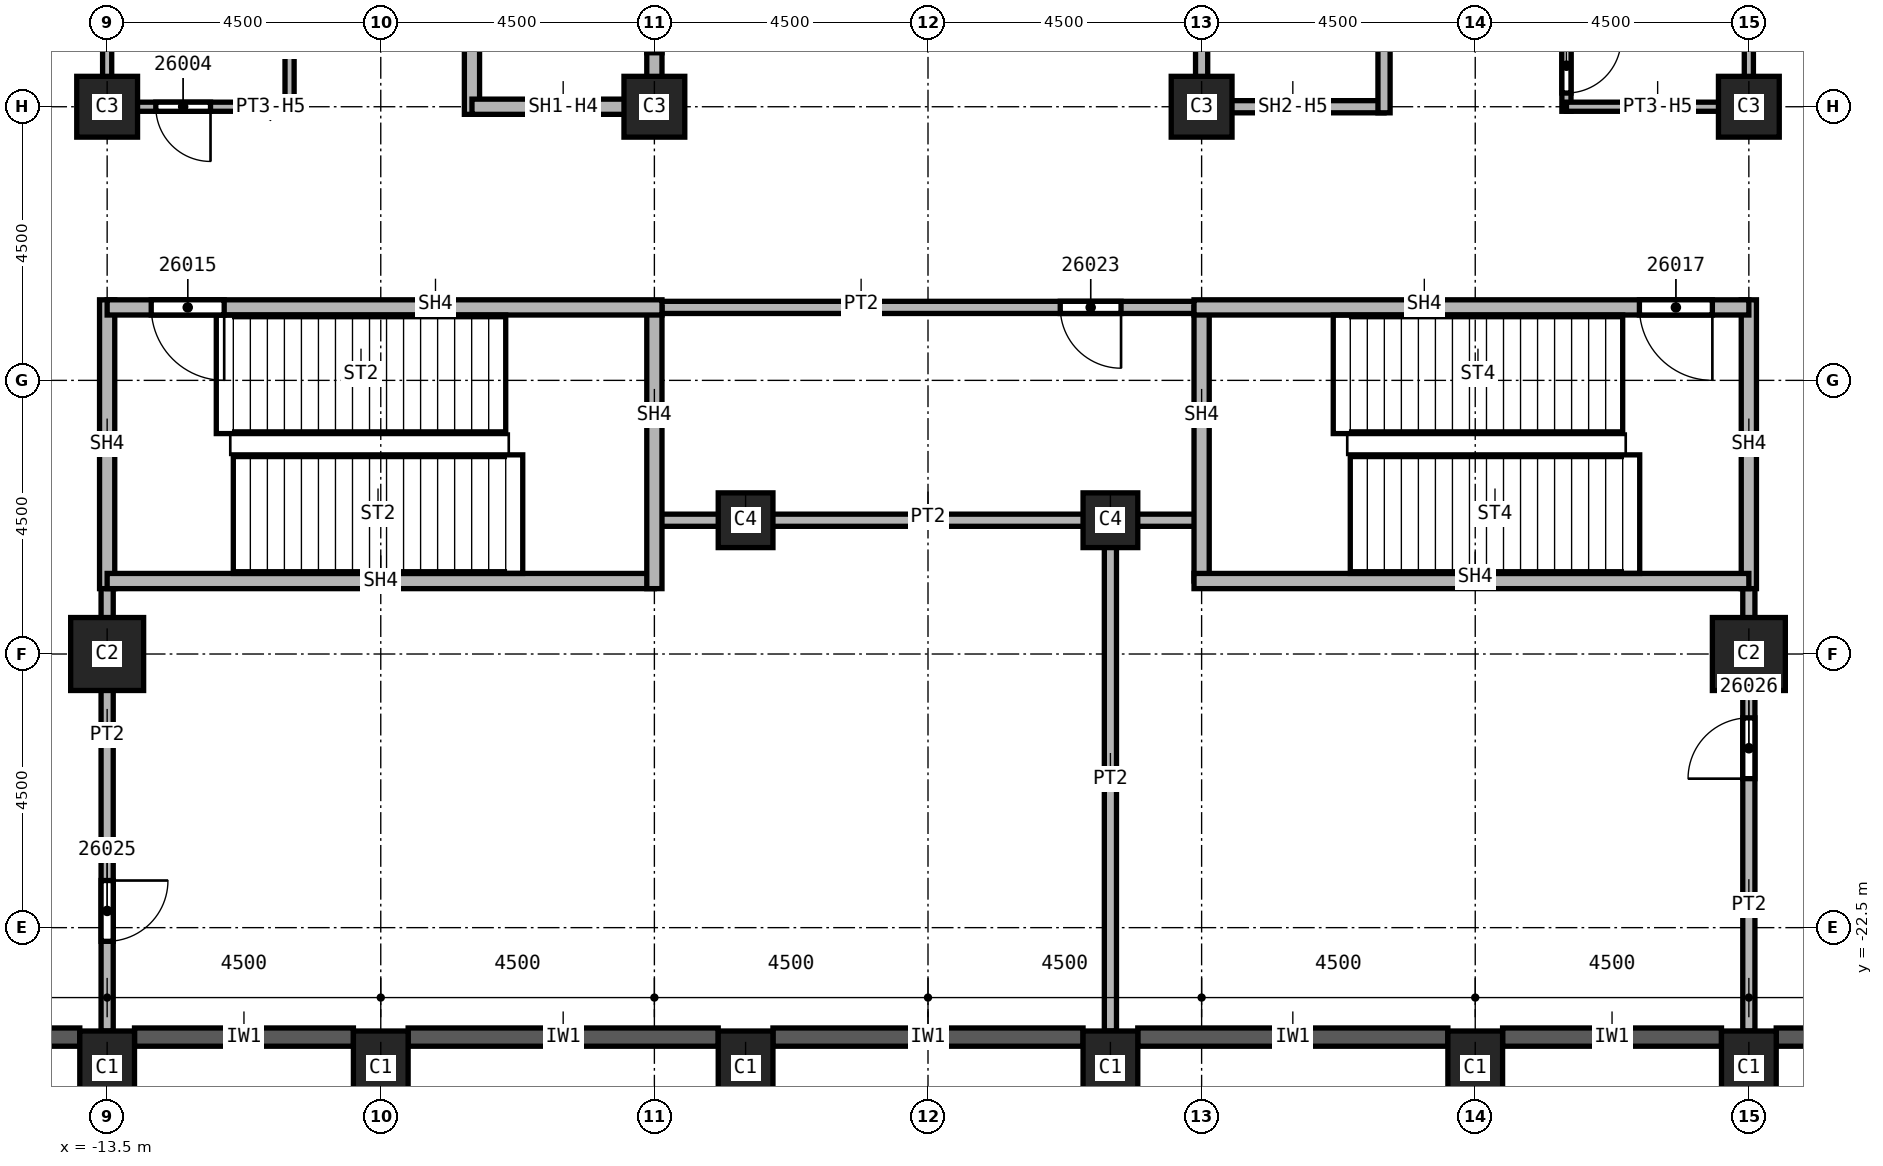
"""IFC4 building model, lengths in metres.
Left out: names, types, materials, properties, quantities, classifications, styles, units other than length and angle.
Written with IfcOpenShell. Run it as: python <this file> out.ifc"""

import sys

from ifc_helpers import new_model, si_unit, direction, frame, frame_2d, origin, origin_2d, place, context, subcontext, project, spatial, rectangle, extrude, element, fill, save


model = new_model("IFC4")
c1 = context("Model", 3, precision=1e-05, world=origin(), true_north=direction((0.0, 1.0)))
c2 = subcontext(c1, "Body", "Model", "MODEL_VIEW")
j1 = project(units=[si_unit("LENGTHUNIT", "METRE"), si_unit("PLANEANGLEUNIT", "RADIAN")], contexts=[c1])
p1 = place(None, origin())
s1 = spatial("IfcSite", under=j1, at=p1, CompositionType="ELEMENT")
p2 = place(p1, origin())
s2 = spatial("IfcBuilding", under=s1, at=p2, CompositionType="ELEMENT")
p3 = place(p2, frame((0.0, 0.0, 120.0)))
s3 = spatial("IfcBuildingStorey", under=s2, at=p3, CompositionType="ELEMENT", Elevation=120.0)
for number, where, z_axis, x_axis in (
    (1, (13.5, -18.0, 0.0), (0.0, 0.0, 1.0), (1.0, 0.0, 0.0)),
    (2, (-13.5, -18.0, 0.0), (0.0, 0.0, 1.0), (1.0, 0.0, 0.0)),
):
    element("IfcColumn", number, at=place(p3, frame(where, z_axis=z_axis, x_axis=x_axis)), inside=s3, PredefinedType="COLUMN", context=c2, shape_type="SweptSolid", body=[
        extrude(rectangle(XDim=1.2, YDim=1.2, at=origin_2d()), origin(), (0.0, 0.0, 1.0), 5.7),
    ])
for number, where, z_axis, x_axis in (
    (3, (4.5, -9.0, 0.0), (0.0, 0.0, 1.0), (1.0, 0.0, 0.0)),
    (4, (13.5, -9.0, 0.0), (0.0, 0.0, 1.0), (1.0, 0.0, 0.0)),
    (5, (-4.5, -9.0, 0.0), (0.0, 0.0, 1.0), (1.0, 0.0, 0.0)),
    (6, (-13.5, -9.0, 0.0), (0.0, 0.0, 1.0), (1.0, 0.0, 0.0)),
):
    element("IfcColumn", number, at=place(p3, frame(where, z_axis=z_axis, x_axis=x_axis)), inside=s3, PredefinedType="COLUMN", context=c2, shape_type="SweptSolid", body=[
        extrude(rectangle(XDim=1.0, YDim=1.0, at=origin_2d()), origin(), (0.0, 0.0, 1.0), 5.7),
    ])
for number, where, z_axis, x_axis in (
    (7, (3.0, -24.8, 0.0), (0.0, 0.206, 0.979), (-1.0, 0.0, 0.0)),
    (8, (9.0, -24.8, 0.0), (0.0, 0.206, 0.979), (-1.0, 0.0, 0.0)),
    (9, (13.5, -24.8, 0.0), (0.0, 0.206, 0.979), (-1.0, 0.0, 0.0)),
    (10, (-3.0, -24.8, 0.0), (0.0, 0.206, 0.979), (-1.0, 0.0, 0.0)),
    (11, (-9.0, -24.8, 0.0), (0.0, 0.206, 0.979), (-1.0, 0.0, 0.0)),
    (12, (-13.5, -24.8, 0.0), (0.0, 0.206, 0.979), (-1.0, 0.0, 0.0)),
):
    element("IfcColumn", number, at=place(p3, frame(where, z_axis=z_axis, x_axis=x_axis)), inside=s3, PredefinedType="COLUMN", context=c2, shape_type="SweptSolid", body=[
        extrude(rectangle(XDim=0.9, YDim=1.2, at=origin_2d()), origin(), (0.0, 0.0, 1.0), 5.825),
    ])
for number, where, z_axis, x_axis in (
    (13, (3.0, -15.8, 0.0), (0.0, 0.206, 0.979), (-1.0, 0.0, 0.0)),
    (14, (-3.0, -15.8, 0.0), (0.0, 0.206, 0.979), (-1.0, 0.0, 0.0)),
):
    element("IfcColumn", number, at=place(p3, frame(where, z_axis=z_axis, x_axis=x_axis)), inside=s3, PredefinedType="COLUMN", context=c2, shape_type="SweptSolid", body=[
        extrude(rectangle(XDim=0.9, YDim=0.9, at=origin_2d()), origin(), (0.0, 0.0, 1.0), 5.825),
    ])
for number, where, z_axis, x_axis in (
    (15, (-17.55, -24.3, 0.0), (0.0, 0.0, 1.0), (1.0, 0.0, 0.0)),
    (16, (-13.05, -24.3, 0.0), (0.0, 0.0, 1.0), (1.0, 0.0, 0.0)),
):
    element("IfcWall", number, at=place(p3, frame(where, z_axis=z_axis, x_axis=x_axis)), inside=s3, PredefinedType="SOLIDWALL", context=c2, shape_type="SweptSolid", body=[
        extrude(rectangle(XDim=3.6, YDim=0.3, at=frame_2d((1.8, 0.0))), origin(), (0.0, 0.0, 1.0), 5.1),
    ])
for number, where, z_axis, x_axis in (
    (17, (-8.55, -24.3, 0.0), (0.0, 0.0, 1.0), (1.0, 0.0, 0.0)),
    (18, (-2.55, -24.3, 0.0), (0.0, 0.0, 1.0), (1.0, 0.0, 0.0)),
    (19, (3.45, -24.3, 0.0), (0.0, 0.0, 1.0), (1.0, 0.0, 0.0)),
):
    element("IfcWall", number, at=place(p3, frame(where, z_axis=z_axis, x_axis=x_axis)), inside=s3, PredefinedType="SOLIDWALL", context=c2, shape_type="SweptSolid", body=[
        extrude(rectangle(XDim=5.1, YDim=0.3, at=frame_2d((2.55, 0.0))), origin(), (0.0, 0.0, 1.0), 5.1),
    ])
for number, where, z_axis, x_axis in (
    (20, (9.45, -24.3, 0.0), (0.0, 0.0, 1.0), (1.0, 0.0, 0.0)),
    (21, (13.95, -24.3, 0.0), (0.0, 0.0, 1.0), (1.0, 0.0, 0.0)),
):
    element("IfcWall", number, at=place(p3, frame(where, z_axis=z_axis, x_axis=x_axis)), inside=s3, PredefinedType="SOLIDWALL", context=c2, shape_type="SweptSolid", body=[
        extrude(rectangle(XDim=3.6, YDim=0.3, at=frame_2d((1.8, 0.0))), origin(), (0.0, 0.0, 1.0), 5.1),
    ])
p4 = place(p3, frame((-13.5, -16.675, 0.0), z_axis=(0.0, 0.0, 1.0), x_axis=(0.0, -1.0, 0.0)))
e22 = element("IfcWall", 22, at=p4, inside=s3, PredefinedType="PARTITIONING", context=c2, shape_type="SweptSolid", body=[
    extrude(rectangle(XDim=7.525, YDim=0.2, at=frame_2d((3.762, 0.0))), origin(), (0.0, 0.0, 1.0), 5.7),
])
p5 = place(p4, frame((5.05, 0.0, 0.0)))
e23 = element("IfcOpeningElement", 23, at=p5, cuts=e22, PredefinedType="OPENING", context=c2, shape_type="SweptSolid", body=[
    extrude(rectangle(XDim=1.0, YDim=2.1, at=frame_2d((0.5, 1.05))), frame((0.0, 0.1, 0.0), z_axis=(0.0, -1.0, 0.0), x_axis=(1.0, 0.0, 0.0)), (0.0, 0.0, 1.0), 0.2),
])
p6 = place(p3, frame((4.5, -15.8, 0.0), z_axis=(0.0, 0.0, 1.0), x_axis=(-1.0, 0.0, 0.0)))
e24 = element("IfcWall", 24, at=p6, inside=s3, PredefinedType="PARTITIONING", context=c2, shape_type="SweptSolid", body=[
    extrude(rectangle(XDim=9.0, YDim=0.2, at=frame_2d((4.5, 0.0))), origin(), (0.0, 0.0, 1.0), 5.7),
])
p7 = place(p3, frame((3.0, -15.8, 0.0), z_axis=(0.0, 0.0, 1.0), x_axis=(0.0, -1.0, 0.0)))
e25 = element("IfcWall", 25, at=p7, inside=s3, PredefinedType="PARTITIONING", context=c2, shape_type="SweptSolid", body=[
    extrude(rectangle(XDim=8.4, YDim=0.2, at=frame_2d((4.2, 0.0))), origin(), (0.0, 0.0, 1.0), 5.7),
])
p8 = place(p3, frame((4.625, -12.3, 0.0), z_axis=(0.0, 0.0, 1.0), x_axis=(-1.0, 0.0, 0.0)))
e26 = element("IfcWall", 26, at=p8, inside=s3, PredefinedType="PARTITIONING", context=c2, shape_type="SweptSolid", body=[
    extrude(rectangle(XDim=9.25, YDim=0.2, at=frame_2d((4.625, 0.0))), origin(), (0.0, 0.0, 1.0), 5.7),
])
p9 = place(p8, frame((1.45, 0.0, 0.0)))
e27 = element("IfcOpeningElement", 27, at=p9, cuts=e26, PredefinedType="OPENING", context=c2, shape_type="SweptSolid", body=[
    extrude(rectangle(XDim=1.0, YDim=2.1, at=frame_2d((0.5, 1.05))), frame((0.0, 0.1, 0.0), z_axis=(0.0, -1.0, 0.0), x_axis=(1.0, 0.0, 0.0)), (0.0, 0.0, 1.0), 0.2),
])
p10 = place(p3, frame((13.5, -24.2, 0.0), z_axis=(0.0, 0.0, 1.0), x_axis=(0.0, 1.0, 0.0)))
e28 = element("IfcWall", 28, at=p10, inside=s3, PredefinedType="PARTITIONING", context=c2, shape_type="SweptSolid", body=[
    extrude(rectangle(XDim=7.525, YDim=0.2, at=frame_2d((3.762, 0.0))), origin(), (0.0, 0.0, 1.0), 5.7),
])
p11 = place(p10, frame((4.15, 0.0, 0.0)))
e29 = element("IfcOpeningElement", 29, at=p11, cuts=e28, PredefinedType="OPENING", context=c2, shape_type="SweptSolid", body=[
    extrude(rectangle(XDim=1.0, YDim=2.1, at=frame_2d((0.5, 1.05))), frame((0.0, 0.1, 0.0), z_axis=(0.0, -1.0, 0.0), x_axis=(1.0, 0.0, 0.0)), (0.0, 0.0, 1.0), 0.2),
])
p12 = place(p3, frame((4.5, -9.1, 0.0), z_axis=(0.0, 0.0, 1.0), x_axis=(0.0, 1.0, 0.0)))
e30 = element("IfcWall", 30, at=p12, inside=s3, PredefinedType="SOLIDWALL", context=c2, shape_type="SweptSolid", body=[
    extrude(rectangle(XDim=9.1, YDim=0.2, at=frame_2d((4.55, 0.0))), origin(), (0.0, 0.0, 1.0), 4.938),
])
p13 = place(p12, frame((2.2, 0.0, 0.0)))
e31 = element("IfcOpeningElement", 31, at=p13, cuts=e30, PredefinedType="OPENING", context=c2, shape_type="SweptSolid", body=[
    extrude(rectangle(XDim=1.1, YDim=2.1, at=frame_2d((0.55, 1.05))), frame((0.0, 0.1, 0.0), z_axis=(0.0, -1.0, 0.0), x_axis=(1.0, 0.0, 0.0)), (0.0, 0.0, 1.0), 0.2),
])
p14 = place(p3, frame((7.5, -9.0, 0.0), z_axis=(0.0, 0.0, 1.0), x_axis=(-1.0, 0.0, 0.0)))
e32 = element("IfcWall", 32, at=p14, inside=s3, PredefinedType="SOLIDWALL", context=c2, shape_type="SweptSolid", body=[
    extrude(rectangle(XDim=3.0, YDim=0.2, at=frame_2d((1.5, 0.0))), origin(), (0.0, 0.0, 1.0), 4.938),
])
p15 = place(p3, frame((7.5, -2.875, 0.0), z_axis=(0.0, 0.0, 1.0), x_axis=(0.0, -1.0, 0.0)))
e33 = element("IfcWall", 33, at=p15, inside=s3, PredefinedType="SOLIDWALL", context=c2, shape_type="SweptSolid", body=[
    extrude(rectangle(XDim=6.225, YDim=0.2, at=frame_2d((3.113, 0.0))), origin(), (0.0, 0.0, 1.0), 5.7),
])
p16 = place(p3, frame((-7.5, -9.125, 0.0), z_axis=(0.0, 0.0, 1.0), x_axis=(0.0, 1.0, 0.0)))
e34 = element("IfcWall", 34, at=p16, inside=s3, PredefinedType="SOLIDWALL", context=c2, shape_type="SweptSolid", body=[
    extrude(rectangle(XDim=12.25, YDim=0.25, at=frame_2d((6.125, 0.0))), origin(), (0.0, 0.0, 1.0), 5.7),
])
p17 = place(p3, frame((-4.5, -9.0, 0.0), z_axis=(0.0, 0.0, 1.0), x_axis=(-1.0, 0.0, 0.0)))
e35 = element("IfcWall", 35, at=p17, inside=s3, PredefinedType="SOLIDWALL", context=c2, shape_type="SweptSolid", body=[
    extrude(rectangle(XDim=3.0, YDim=0.25, at=frame_2d((1.5, 0.0))), origin(), (0.0, 0.0, 1.0), 4.938),
])
p18 = place(p3, frame((-4.5, 0.0, 0.0), z_axis=(0.0, 0.0, 1.0), x_axis=(0.0, -1.0, 0.0)))
e36 = element("IfcWall", 36, at=p18, inside=s3, PredefinedType="SOLIDWALL", context=c2, shape_type="SweptSolid", body=[
    extrude(rectangle(XDim=9.125, YDim=0.25, at=frame_2d((4.562, 0.0))), origin(), (0.0, 0.0, 1.0), 4.938),
])
p19 = place(p18, frame((7.012, 0.0, 0.0)))
e37 = element("IfcOpeningElement", 37, at=p19, cuts=e36, PredefinedType="OPENING", context=c2, shape_type="SweptSolid", body=[
    extrude(rectangle(XDim=1.1, YDim=2.1, at=frame_2d((0.55, 1.05))), frame((0.0, 0.125, 0.0), z_axis=(0.0, -1.0, 0.0), x_axis=(1.0, 0.0, 0.0)), (0.0, 0.0, 1.0), 0.25),
])
p20 = place(p18, frame((3.95, 0.0, 0.0)))
e38 = element("IfcOpeningElement", 38, at=p20, cuts=e36, PredefinedType="OPENING", context=c2, shape_type="SweptSolid", body=[
    extrude(rectangle(XDim=1.1, YDim=2.1, at=frame_2d((0.55, 1.05))), frame((0.0, 0.125, 0.0), z_axis=(0.0, -1.0, 0.0), x_axis=(1.0, 0.0, 0.0)), (0.0, 0.0, 1.0), 0.25),
])
p21 = place(p18, frame((0.95, 0.0, 0.0)))
e39 = element("IfcOpeningElement", 39, at=p21, cuts=e36, PredefinedType="OPENING", context=c2, shape_type="SweptSolid", body=[
    extrude(rectangle(XDim=1.1, YDim=2.1, at=frame_2d((0.55, 1.05))), frame((0.0, 0.125, 0.0), z_axis=(0.0, -1.0, 0.0), x_axis=(1.0, 0.0, 0.0)), (0.0, 0.0, 1.0), 0.25),
])
p22 = place(p3, frame((-13.5, -12.175, 0.0), z_axis=(0.0, 0.0, 1.0), x_axis=(0.0, -1.0, 0.0)))
e40 = element("IfcWall", 40, at=p22, inside=s3, PredefinedType="SOLIDWALL", context=c2, shape_type="SweptSolid", body=[
    extrude(rectangle(XDim=4.75, YDim=0.25, at=frame_2d((2.375, 0.0))), origin(), (0.0, 0.0, 1.0), 5.7),
])
p23 = place(p3, frame((-4.5, -16.8, 0.0), z_axis=(0.0, 0.0, 1.0), x_axis=(-1.0, 0.0, 0.0)))
e41 = element("IfcWall", 41, at=p23, inside=s3, PredefinedType="SOLIDWALL", context=c2, shape_type="SweptSolid", body=[
    extrude(rectangle(XDim=9.0, YDim=0.25, at=frame_2d((4.5, 0.0))), origin(), (0.0, 0.0, 1.0), 5.7),
])
p24 = place(p3, frame((-4.5, -12.3, 0.0), z_axis=(0.0, 0.0, 1.0), x_axis=(0.0, -1.0, 0.0)))
e42 = element("IfcWall", 42, at=p24, inside=s3, PredefinedType="SOLIDWALL", context=c2, shape_type="SweptSolid", body=[
    extrude(rectangle(XDim=4.625, YDim=0.25, at=frame_2d((2.312, 0.0))), origin(), (0.0, 0.0, 1.0), 5.7),
])
p25 = place(p3, frame((-4.375, -12.3, 0.0), z_axis=(0.0, 0.0, 1.0), x_axis=(-1.0, 0.0, 0.0)))
e43 = element("IfcWall", 43, at=p25, inside=s3, PredefinedType="SOLIDWALL", context=c2, shape_type="SweptSolid", body=[
    extrude(rectangle(XDim=9.125, YDim=0.25, at=frame_2d((4.562, 0.0))), origin(), (0.0, 0.0, 1.0), 5.7),
])
p26 = place(p25, frame((7.2, 0.0, 0.0)))
e44 = element("IfcOpeningElement", 44, at=p26, cuts=e43, PredefinedType="OPENING", context=c2, shape_type="SweptSolid", body=[
    extrude(rectangle(XDim=1.2, YDim=2.1, at=frame_2d((0.6, 1.05))), frame((0.0, 0.125, 0.0), z_axis=(0.0, -1.0, 0.0), x_axis=(1.0, 0.0, 0.0)), (0.0, 0.0, 1.0), 0.25),
])
p27 = place(p3, frame((4.5, -16.8, 0.0), z_axis=(0.0, 0.0, 1.0), x_axis=(0.0, 1.0, 0.0)))
e45 = element("IfcWall", 45, at=p27, inside=s3, PredefinedType="SOLIDWALL", context=c2, shape_type="SweptSolid", body=[
    extrude(rectangle(XDim=4.5, YDim=0.25, at=frame_2d((2.25, 0.0))), origin(), (0.0, 0.0, 1.0), 5.7),
])
p28 = place(p3, frame((13.5, -16.925, 0.0), z_axis=(0.0, 0.0, 1.0), x_axis=(0.0, 1.0, 0.0)))
e46 = element("IfcWall", 46, at=p28, inside=s3, PredefinedType="SOLIDWALL", context=c2, shape_type="SweptSolid", body=[
    extrude(rectangle(XDim=4.75, YDim=0.25, at=frame_2d((2.375, 0.0))), origin(), (0.0, 0.0, 1.0), 5.7),
])
p29 = place(p3, frame((13.5, -16.8, 0.0), z_axis=(0.0, 0.0, 1.0), x_axis=(-1.0, 0.0, 0.0)))
e47 = element("IfcWall", 47, at=p29, inside=s3, PredefinedType="SOLIDWALL", context=c2, shape_type="SweptSolid", body=[
    extrude(rectangle(XDim=9.125, YDim=0.25, at=frame_2d((4.562, 0.0))), origin(), (0.0, 0.0, 1.0), 5.7),
])
p30 = place(p3, frame((13.5, -12.3, 0.0), z_axis=(0.0, 0.0, 1.0), x_axis=(-1.0, 0.0, 0.0)))
e48 = element("IfcWall", 48, at=p30, inside=s3, PredefinedType="SOLIDWALL", context=c2, shape_type="SweptSolid", body=[
    extrude(rectangle(XDim=9.125, YDim=0.25, at=frame_2d((4.562, 0.0))), origin(), (0.0, 0.0, 1.0), 5.7),
])
p31 = place(p30, frame((0.6, 0.0, 0.0)))
e49 = element("IfcOpeningElement", 49, at=p31, cuts=e48, PredefinedType="OPENING", context=c2, shape_type="SweptSolid", body=[
    extrude(rectangle(XDim=1.2, YDim=2.1, at=frame_2d((0.6, 1.05))), frame((0.0, 0.125, 0.0), z_axis=(0.0, -1.0, 0.0), x_axis=(1.0, 0.0, 0.0)), (0.0, 0.0, 1.0), 0.25),
])
p32 = place(p3, frame((-13.5, -9.075, 0.0), z_axis=(0.0, 0.0, 1.0), x_axis=(0.0, 1.0, 0.0)))
e50 = element("IfcWall", 50, at=p32, inside=s3, PredefinedType="PARTITIONING", context=c2, shape_type="SweptSolid", body=[
    extrude(rectangle(XDim=2.075, YDim=0.15, at=frame_2d((1.038, 0.0))), origin(), (0.0, 0.0, 1.0), 4.938),
])
p33 = place(p3, frame((-10.5, -9.075, 0.0), z_axis=(0.0, 0.0, 1.0), x_axis=(0.0, 1.0, 0.0)))
e51 = element("IfcWall", 51, at=p33, inside=s3, PredefinedType="PARTITIONING", context=c2, shape_type="SweptSolid", body=[
    extrude(rectangle(XDim=2.15, YDim=0.15, at=frame_2d((1.075, 0.0))), origin(), (0.0, 0.0, 1.0), 5.7),
])
p34 = place(p3, frame((-10.5, -9.0, 0.0), z_axis=(0.0, 0.0, 1.0), x_axis=(-1.0, 0.0, 0.0)))
e52 = element("IfcWall", 52, at=p34, inside=s3, PredefinedType="PARTITIONING", context=c2, shape_type="SweptSolid", body=[
    extrude(rectangle(XDim=3.0, YDim=0.15, at=frame_2d((1.5, 0.0))), origin(), (0.0, 0.0, 1.0), 4.938),
])
p35 = place(p34, frame((1.3, 0.0, 0.0)))
e53 = element("IfcOpeningElement", 53, at=p35, cuts=e52, PredefinedType="OPENING", context=c2, shape_type="SweptSolid", body=[
    extrude(rectangle(XDim=0.9, YDim=2.1, at=frame_2d((0.45, 1.05))), frame((0.0, 0.075, 0.0), z_axis=(0.0, -1.0, 0.0), x_axis=(1.0, 0.0, 0.0)), (0.0, 0.0, 1.0), 0.15),
])
p36 = place(p3, frame((10.5, -4.925, 0.0), z_axis=(0.0, 0.0, 1.0), x_axis=(0.0, -1.0, 0.0)))
e54 = element("IfcWall", 54, at=p36, inside=s3, PredefinedType="PARTITIONING", context=c2, shape_type="SweptSolid", body=[
    extrude(rectangle(XDim=4.15, YDim=0.15, at=frame_2d((2.075, 0.0))), origin(), (0.0, 0.0, 1.0), 5.7),
])
p37 = place(p36, frame((2.95, 0.0, 0.0)))
e55 = element("IfcOpeningElement", 55, at=p37, cuts=e54, PredefinedType="OPENING", context=c2, shape_type="SweptSolid", body=[
    extrude(rectangle(XDim=0.9, YDim=2.1, at=frame_2d((0.45, 1.05))), frame((0.0, 0.075, 0.0), z_axis=(0.0, -1.0, 0.0), x_axis=(1.0, 0.0, 0.0)), (0.0, 0.0, 1.0), 0.15),
])
p38 = place(p3, frame((13.5, -9.0, 0.0), z_axis=(0.0, 0.0, 1.0), x_axis=(-1.0, 0.0, 0.0)))
e56 = element("IfcWall", 56, at=p38, inside=s3, PredefinedType="PARTITIONING", context=c2, shape_type="SweptSolid", body=[
    extrude(rectangle(XDim=3.0, YDim=0.15, at=frame_2d((1.5, 0.0))), origin(), (0.0, 0.0, 1.0), 4.938),
])
p39 = place(p3, frame((13.5, -5.0, 0.0), z_axis=(0.0, 0.0, 1.0), x_axis=(0.0, -1.0, 0.0)))
e57 = element("IfcWall", 57, at=p39, inside=s3, PredefinedType="PARTITIONING", context=c2, shape_type="SweptSolid", body=[
    extrude(rectangle(XDim=4.075, YDim=0.15, at=frame_2d((2.038, 0.0))), origin(), (0.0, 0.0, 1.0), 4.938),
])
p40 = place(p35, origin())
e58 = element("IfcDoor", 58, at=p40, inside=s3, OperationType="SINGLE_SWING_LEFT", PredefinedType="DOOR", context=c2, shape_type="SweptSolid", body=[
    extrude(rectangle(XDim=0.9, YDim=2.1, at=frame_2d((0.45, 1.05))), frame((0.0, 0.025, 0.0), z_axis=(0.0, -1.0, 0.0), x_axis=(1.0, 0.0, 0.0)), (0.0, 0.0, 1.0), 0.05),
])
fill(e53, e58)
p41 = place(p37, origin())
e59 = element("IfcDoor", 59, at=p41, inside=s3, OperationType="SINGLE_SWING_RIGHT", PredefinedType="DOOR", context=c2, shape_type="SweptSolid", body=[
    extrude(rectangle(XDim=0.9, YDim=2.1, at=frame_2d((0.45, 1.05))), frame((0.0, 0.025, 0.0), z_axis=(0.0, -1.0, 0.0), x_axis=(1.0, 0.0, 0.0)), (0.0, 0.0, 1.0), 0.05),
])
fill(e55, e59)
p42 = place(p26, origin())
e60 = element("IfcDoor", 60, at=p42, inside=s3, OperationType="SINGLE_SWING_RIGHT", PredefinedType="DOOR", context=c2, shape_type="SweptSolid", body=[
    extrude(rectangle(XDim=1.2, YDim=2.1, at=frame_2d((0.6, 1.05))), frame((0.0, 0.025, 0.0), z_axis=(0.0, -1.0, 0.0), x_axis=(1.0, 0.0, 0.0)), (0.0, 0.0, 1.0), 0.05),
])
fill(e44, e60)
p43 = place(p31, origin())
e61 = element("IfcDoor", 61, at=p43, inside=s3, OperationType="SINGLE_SWING_RIGHT", PredefinedType="DOOR", context=c2, shape_type="SweptSolid", body=[
    extrude(rectangle(XDim=1.2, YDim=2.1, at=frame_2d((0.6, 1.05))), frame((0.0, 0.025, 0.0), z_axis=(0.0, -1.0, 0.0), x_axis=(1.0, 0.0, 0.0)), (0.0, 0.0, 1.0), 0.05),
])
fill(e49, e61)
p44 = place(p9, origin())
e62 = element("IfcDoor", 62, at=p44, inside=s3, OperationType="SINGLE_SWING_RIGHT", PredefinedType="DOOR", context=c2, shape_type="SweptSolid", body=[
    extrude(rectangle(XDim=1.0, YDim=2.1, at=frame_2d((0.5, 1.05))), frame((0.0, 0.025, 0.0), z_axis=(0.0, -1.0, 0.0), x_axis=(1.0, 0.0, 0.0)), (0.0, 0.0, 1.0), 0.05),
])
fill(e27, e62)
p45 = place(p5, origin())
e63 = element("IfcDoor", 63, at=p45, inside=s3, OperationType="SINGLE_SWING_RIGHT", PredefinedType="DOOR", context=c2, shape_type="SweptSolid", body=[
    extrude(rectangle(XDim=1.0, YDim=2.1, at=frame_2d((0.5, 1.05))), frame((0.0, 0.025, 0.0), z_axis=(0.0, -1.0, 0.0), x_axis=(1.0, 0.0, 0.0)), (0.0, 0.0, 1.0), 0.05),
])
fill(e23, e63)
p46 = place(p11, origin())
e64 = element("IfcDoor", 64, at=p46, inside=s3, OperationType="SINGLE_SWING_LEFT", PredefinedType="DOOR", context=c2, shape_type="SweptSolid", body=[
    extrude(rectangle(XDim=1.0, YDim=2.1, at=frame_2d((0.5, 1.05))), frame((0.0, 0.025, 0.0), z_axis=(0.0, -1.0, 0.0), x_axis=(1.0, 0.0, 0.0)), (0.0, 0.0, 1.0), 0.05),
])
fill(e29, e64)
p47 = place(p19, origin())
e65 = element("IfcDoor", 65, at=p47, inside=s3, OperationType="SLIDING_TO_LEFT", PredefinedType="DOOR", context=c2, shape_type="SweptSolid", body=[
    extrude(rectangle(XDim=1.1, YDim=2.1, at=frame_2d((0.55, 1.05))), frame((0.0, 0.025, 0.0), z_axis=(0.0, -1.0, 0.0), x_axis=(1.0, 0.0, 0.0)), (0.0, 0.0, 1.0), 0.05),
])
fill(e37, e65)
save(model, sys.argv[1])
